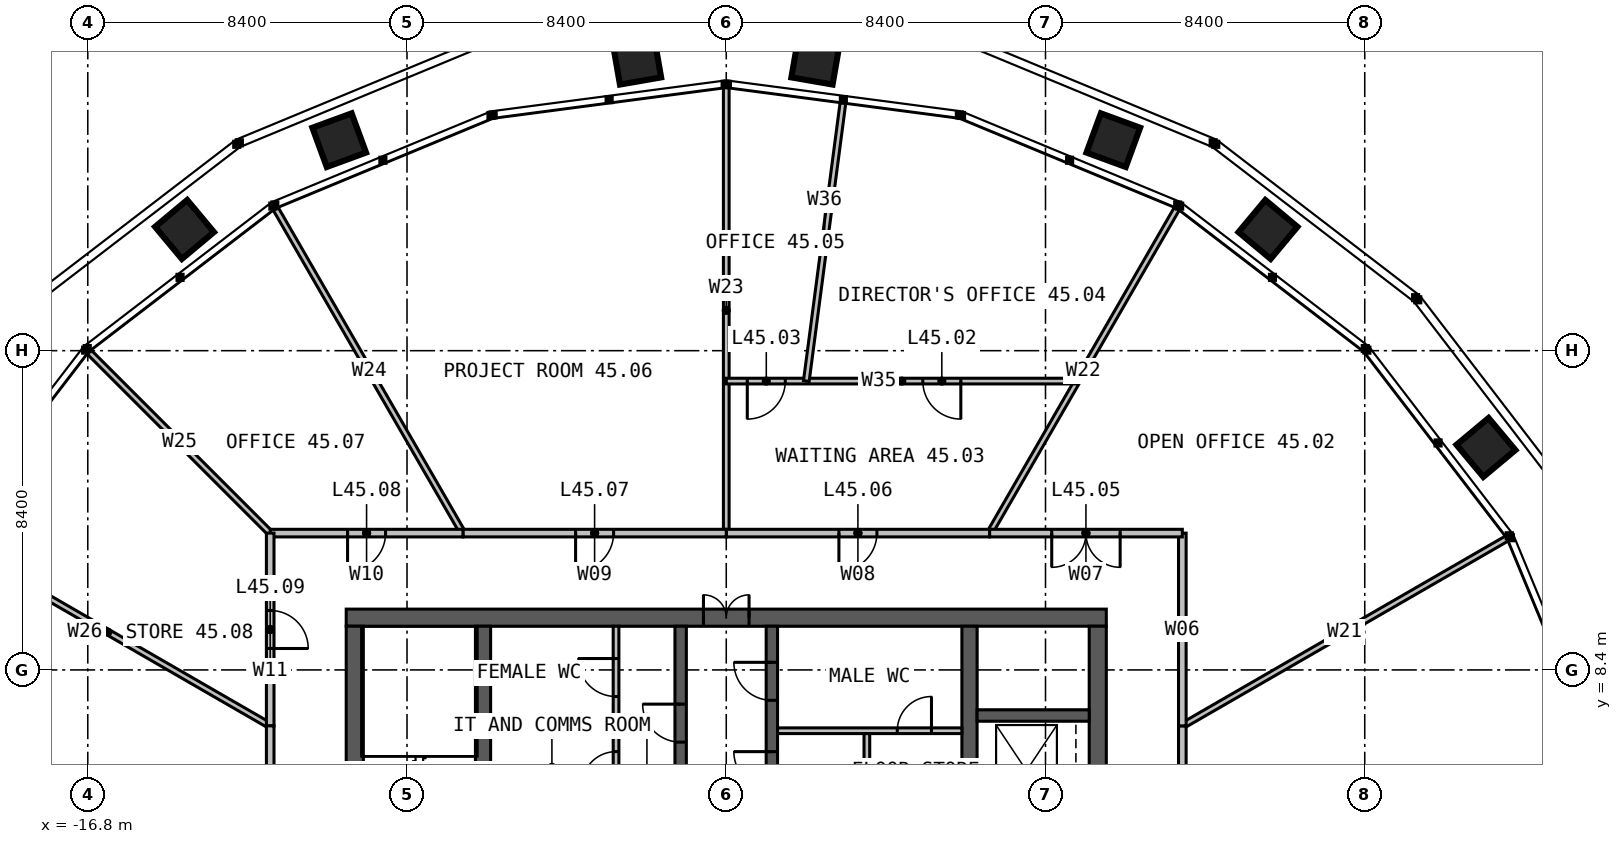
"""IFC4 building model, lengths in metres.
Left out: names, types, materials, properties, quantities, classifications, styles, units other than length and angle.
Written with IfcOpenShell. Run it as: python <this file> out.ifc"""

import sys

from ifc_helpers import new_model, si_unit, direction, frame, frame_2d, origin, place, context, subcontext, project, spatial, rectangle, extrude, element, fill, save


model = new_model("IFC4")
c1 = context("Model", 3, precision=1e-05, world=origin(), true_north=direction((0.0, 1.0)))
c2 = subcontext(c1, "Body", "Model", "MODEL_VIEW")
j1 = project(units=[si_unit("LENGTHUNIT", "METRE"), si_unit("PLANEANGLEUNIT", "RADIAN")], contexts=[c1])
p1 = place(None, origin())
s1 = spatial("IfcSite", under=j1, at=p1, CompositionType="ELEMENT")
p2 = place(p1, origin())
s2 = spatial("IfcBuilding", under=s1, at=p2, CompositionType="ELEMENT")
p3 = place(p2, frame((0.0, 0.0, 187.0)))
s3 = spatial("IfcBuildingStorey", under=s2, at=p3, CompositionType="ELEMENT", Elevation=187.0)
p4 = place(p3, frame((-10.0, 9.775, 0.0), z_axis=(0.0, 0.0, 1.0), x_axis=(1.0, 0.0, 0.0)))
e1 = element("IfcWall", 1, at=p4, inside=s3, PredefinedType="SOLIDWALL", context=c2, shape_type="SweptSolid", body=[
    extrude(rectangle(XDim=20.0, YDim=0.45, at=frame_2d((10.0, 0.0))), origin(), (0.0, 0.0, 1.0), 4.0),
])
p5 = place(p4, frame((9.4, 0.0, 0.0)))
e2 = element("IfcOpeningElement", 2, at=p5, cuts=e1, PredefinedType="OPENING", context=c2, shape_type="SweptSolid", body=[
    extrude(rectangle(XDim=1.2, YDim=2.2, at=frame_2d((0.6, 1.1))), frame((0.0, 0.235, 0.0), z_axis=(0.0, -1.0, 0.0), x_axis=(1.0, 0.0, 0.0)), (0.0, 0.0, 1.0), 0.47),
])
for number, where, z_axis, x_axis in (
    (3, (9.775, -9.55, 0.0), (0.0, 0.0, 1.0), (0.0, 1.0, 0.0)),
    (4, (-9.775, 9.55, 0.0), (0.0, 0.0, 1.0), (0.0, -1.0, 0.0)),
):
    element("IfcWall", number, at=place(p3, frame(where, z_axis=z_axis, x_axis=x_axis)), inside=s3, PredefinedType="SOLIDWALL", context=c2, shape_type="SweptSolid", body=[
        extrude(rectangle(XDim=19.1, YDim=0.45, at=frame_2d((9.55, 0.0))), origin(), (0.0, 0.0, 1.0), 4.0),
    ])
p6 = place(p3, frame((-6.4, -9.55, 0.0), z_axis=(0.0, 0.0, 1.0), x_axis=(0.0, 1.0, 0.0)))
e5 = element("IfcWall", 5, at=p6, inside=s3, PredefinedType="SOLIDWALL", context=c2, shape_type="SweptSolid", body=[
    extrude(rectangle(XDim=19.1, YDim=0.4, at=frame_2d((9.55, 0.0))), origin(), (0.0, 0.0, 1.0), 4.0),
])
p7 = place(p6, frame((9.05, 0.0, 0.0)))
e6 = element("IfcOpeningElement", 6, at=p7, cuts=e5, PredefinedType="OPENING", context=c2, shape_type="SweptSolid", body=[
    extrude(rectangle(XDim=1.0, YDim=2.2, at=frame_2d((0.5, 1.1))), frame((0.0, 0.21, 0.0), z_axis=(0.0, -1.0, 0.0), x_axis=(1.0, 0.0, 0.0)), (0.0, 0.0, 1.0), 0.42),
])
p8 = place(p3, frame((6.4, 9.55, 0.0), z_axis=(0.0, 0.0, 1.0), x_axis=(0.0, -1.0, 0.0)))
e7 = element("IfcWall", 7, at=p8, inside=s3, PredefinedType="SOLIDWALL", context=c2, shape_type="SweptSolid", body=[
    extrude(rectangle(XDim=19.1, YDim=0.4, at=frame_2d((9.55, 0.0))), origin(), (0.0, 0.0, 1.0), 4.0),
])
p9 = place(p8, frame((9.05, 0.0, 0.0)))
e8 = element("IfcOpeningElement", 8, at=p9, cuts=e7, PredefinedType="OPENING", context=c2, shape_type="SweptSolid", body=[
    extrude(rectangle(XDim=1.0, YDim=2.2, at=frame_2d((0.5, 1.1))), frame((0.0, 0.21, 0.0), z_axis=(0.0, -1.0, 0.0), x_axis=(1.0, 0.0, 0.0)), (0.0, 0.0, 1.0), 0.42),
])
p10 = place(p3, frame((-1.2, 1.45, 0.0), z_axis=(0.0, 0.0, 1.0), x_axis=(0.0, 1.0, 0.0)))
e9 = element("IfcWall", 9, at=p10, inside=s3, PredefinedType="SOLIDWALL", context=c2, shape_type="SweptSolid", body=[
    extrude(rectangle(XDim=8.1, YDim=0.3, at=frame_2d((4.05, 0.0))), origin(), (0.0, 0.0, 1.0), 4.0),
])
p11 = place(p10, frame((5.05, 0.0, 0.0)))
e10 = element("IfcOpeningElement", 10, at=p11, cuts=e9, PredefinedType="OPENING", context=c2, shape_type="SweptSolid", body=[
    extrude(rectangle(XDim=1.0, YDim=2.2, at=frame_2d((0.5, 1.1))), frame((0.0, 0.16, 0.0), z_axis=(0.0, -1.0, 0.0), x_axis=(1.0, 0.0, 0.0)), (0.0, 0.0, 1.0), 0.32),
])
p12 = place(p3, frame((1.2, 1.45, 0.0), z_axis=(0.0, 0.0, 1.0), x_axis=(0.0, 1.0, 0.0)))
e11 = element("IfcWall", 11, at=p12, inside=s3, PredefinedType="SOLIDWALL", context=c2, shape_type="SweptSolid", body=[
    extrude(rectangle(XDim=8.1, YDim=0.3, at=frame_2d((4.05, 0.0))), origin(), (0.0, 0.0, 1.0), 4.0),
])
p13 = place(p12, frame((3.8, 0.0, 0.0)))
e12 = element("IfcOpeningElement", 12, at=p13, cuts=e11, PredefinedType="OPENING", context=c2, shape_type="SweptSolid", body=[
    extrude(rectangle(XDim=1.0, YDim=2.2, at=frame_2d((0.5, 1.1))), frame((0.0, 0.16, 0.0), z_axis=(0.0, -1.0, 0.0), x_axis=(1.0, 0.0, 0.0)), (0.0, 0.0, 1.0), 0.32),
])
p14 = place(p12, frame((6.15, 0.0, 0.0)))
e13 = element("IfcOpeningElement", 13, at=p14, cuts=e11, PredefinedType="OPENING", context=c2, shape_type="SweptSolid", body=[
    extrude(rectangle(XDim=1.0, YDim=2.2, at=frame_2d((0.5, 1.1))), frame((0.0, 0.16, 0.0), z_axis=(0.0, -1.0, 0.0), x_axis=(1.0, 0.0, 0.0)), (0.0, 0.0, 1.0), 0.32),
])
p15 = place(p3, frame((6.6, 7.2, 0.0), z_axis=(0.0, 0.0, 1.0), x_axis=(1.0, 0.0, 0.0)))
e14 = element("IfcWall", 14, at=p15, inside=s3, PredefinedType="SOLIDWALL", context=c2, shape_type="SweptSolid", body=[
    extrude(rectangle(XDim=2.95, YDim=0.3, at=frame_2d((1.475, 0.0))), origin(), (0.0, 0.0, 1.0), 4.0),
])
p16 = place(p3, frame((1.35, 6.8, 0.0), z_axis=(0.0, 0.0, 1.0), x_axis=(1.0, 0.0, 0.0)))
e15 = element("IfcWall", 15, at=p16, inside=s3, PredefinedType="PARTITIONING", context=c2, shape_type="SweptSolid", body=[
    extrude(rectangle(XDim=4.85, YDim=0.15, at=frame_2d((2.425, 0.0))), origin(), (0.0, 0.0, 1.0), 3.75),
])
p17 = place(p16, frame((3.15, 0.0, 0.0)))
e16 = element("IfcOpeningElement", 16, at=p17, cuts=e15, PredefinedType="OPENING", context=c2, shape_type="SweptSolid", body=[
    extrude(rectangle(XDim=0.9, YDim=2.2, at=frame_2d((0.45, 1.1))), frame((0.0, 0.085, 0.0), z_axis=(0.0, -1.0, 0.0), x_axis=(1.0, 0.0, 0.0)), (0.0, 0.0, 1.0), 0.17),
])
p18 = place(p3, frame((3.7, 4.75, 0.0), z_axis=(0.0, 0.0, 1.0), x_axis=(0.0, 1.0, 0.0)))
e17 = element("IfcWall", 17, at=p18, inside=s3, PredefinedType="PARTITIONING", context=c2, shape_type="SweptSolid", body=[
    extrude(rectangle(XDim=1.975, YDim=0.15, at=frame_2d((0.988, 0.0))), origin(), (0.0, 0.0, 1.0), 3.75),
])
p19 = place(p3, frame((-2.9, 4.75, 0.0), z_axis=(0.0, 0.0, 1.0), x_axis=(0.0, 1.0, 0.0)))
e18 = element("IfcWall", 18, at=p19, inside=s3, PredefinedType="PARTITIONING", context=c2, shape_type="SweptSolid", body=[
    extrude(rectangle(XDim=4.8, YDim=0.15, at=frame_2d((2.4, 0.0))), origin(), (0.0, 0.0, 1.0), 3.75),
])
p20 = place(p19, frame((2.95, 0.0, 0.0)))
e19 = element("IfcOpeningElement", 19, at=p20, cuts=e18, PredefinedType="OPENING", context=c2, shape_type="SweptSolid", body=[
    extrude(rectangle(XDim=1.0, YDim=2.2, at=frame_2d((0.5, 1.1))), frame((0.0, 0.085, 0.0), z_axis=(0.0, -1.0, 0.0), x_axis=(1.0, 0.0, 0.0)), (0.0, 0.0, 1.0), 0.17),
])
p21 = place(p19, frame((0.6, 0.0, 0.0)))
e20 = element("IfcOpeningElement", 20, at=p21, cuts=e18, PredefinedType="OPENING", context=c2, shape_type="SweptSolid", body=[
    extrude(rectangle(XDim=0.9, YDim=2.2, at=frame_2d((0.45, 1.1))), frame((0.0, 0.085, 0.0), z_axis=(0.0, -1.0, 0.0), x_axis=(1.0, 0.0, 0.0)), (0.0, 0.0, 1.0), 0.17),
])
p22 = place(p3, frame((-6.2, 7.0, 0.0), z_axis=(0.0, 0.0, 1.0), x_axis=(1.0, 0.0, 0.0)))
e21 = element("IfcWall", 21, at=p22, inside=s3, PredefinedType="PARTITIONING", context=c2, shape_type="SweptSolid", body=[
    extrude(rectangle(XDim=3.225, YDim=0.15, at=frame_2d((1.612, 0.0))), origin(), (0.0, 0.0, 1.0), 3.75),
])
for number, where, z_axis, x_axis in (
    (22, (12.0, 6.928, 0.0), (0.0, 0.0, 1.0), (0.866, 0.5, 0.0)),
    (23, (6.928, 12.0, 0.0), (0.0, 0.0, 1.0), (0.5, 0.866, 0.0)),
):
    element("IfcWall", number, at=place(p3, frame(where, z_axis=z_axis, x_axis=x_axis)), inside=s3, PredefinedType="PARTITIONING", context=c2, shape_type="SweptSolid", body=[
        extrude(rectangle(XDim=9.865, YDim=0.15, at=frame_2d((4.932, 0.0))), origin(), (0.0, 0.0, 1.0), 2.79),
    ])
p23 = place(p3, frame((0.0, 12.0, 0.0), z_axis=(0.0, 0.0, 1.0), x_axis=(0.0, 1.0, 0.0)))
e24 = element("IfcWall", 24, at=p23, inside=s3, PredefinedType="PARTITIONING", context=c2, shape_type="SweptSolid", body=[
    extrude(rectangle(XDim=11.721, YDim=0.15, at=frame_2d((5.861, 0.0))), origin(), (0.0, 0.0, 1.0), 2.79),
])
p24 = place(p3, frame((-6.928, 12.0, 0.0), z_axis=(0.0, 0.0, 1.0), x_axis=(-0.49999595416, 0.866027739639, 0.0)))
e25 = element("IfcWall", 25, at=p24, inside=s3, PredefinedType="PARTITIONING", context=c2, shape_type="SweptSolid", body=[
    extrude(rectangle(XDim=9.865, YDim=0.15, at=frame_2d((4.932, 0.0))), origin(), (0.0, 0.0, 1.0), 2.79),
])
p25 = place(p3, frame((-12.0, 12.0, 0.0), z_axis=(0.0, 0.0, 1.0), x_axis=(-0.707106781187, 0.707106781187, 0.0)))
e26 = element("IfcWall", 26, at=p25, inside=s3, PredefinedType="PARTITIONING", context=c2, shape_type="SweptSolid", body=[
    extrude(rectangle(XDim=6.751, YDim=0.15, at=frame_2d((3.375, 0.0))), origin(), (0.0, 0.0, 1.0), 2.79),
])
p26 = place(p3, frame((-12.0, 6.928, 0.0), z_axis=(0.0, 0.0, 1.0), x_axis=(-0.866027739639, 0.49999595416, 0.0)))
e27 = element("IfcWall", 27, at=p26, inside=s3, PredefinedType="PARTITIONING", context=c2, shape_type="SweptSolid", body=[
    extrude(rectangle(XDim=9.865, YDim=0.15, at=frame_2d((4.932, 0.0))), origin(), (0.0, 0.0, 1.0), 2.79),
])
p27 = place(p3, frame((12.0, -6.928, 0.0), z_axis=(0.0, 0.0, 1.0), x_axis=(0.0, 1.0, 0.0)))
e28 = element("IfcWall", 28, at=p27, inside=s3, PredefinedType="PARTITIONING", context=c2, shape_type="SweptSolid", body=[
    extrude(rectangle(XDim=13.856, YDim=0.2, at=frame_2d((6.928, 0.0))), origin(), (0.0, 0.0, 1.0), 3.8),
])
p28 = place(p27, frame((6.028, 0.0, 0.0)))
e29 = element("IfcOpeningElement", 29, at=p28, cuts=e28, PredefinedType="OPENING", context=c2, shape_type="SweptSolid", body=[
    extrude(rectangle(XDim=1.8, YDim=2.2, at=frame_2d((0.9, 1.1))), frame((0.0, 0.11, 0.0), z_axis=(0.0, -1.0, 0.0), x_axis=(1.0, 0.0, 0.0)), (0.0, 0.0, 1.0), 0.22),
])
p29 = place(p3, frame((12.0, 6.928, 0.0), z_axis=(0.0, 0.0, 1.0), x_axis=(0.0, 1.0, 0.0)))
e30 = element("IfcWall", 30, at=p29, inside=s3, PredefinedType="PARTITIONING", context=c2, shape_type="SweptSolid", body=[
    extrude(rectangle(XDim=5.072, YDim=0.2, at=frame_2d((2.536, 0.0))), origin(), (0.0, 0.0, 1.0), 3.8),
])
p30 = place(p3, frame((12.0, 12.0, 0.0), z_axis=(0.0, 0.0, 1.0), x_axis=(-1.0, 0.0, 0.0)))
e31 = element("IfcWall", 31, at=p30, inside=s3, PredefinedType="PARTITIONING", context=c2, shape_type="SweptSolid", body=[
    extrude(rectangle(XDim=5.072, YDim=0.2, at=frame_2d((2.536, 0.0))), origin(), (0.0, 0.0, 1.0), 3.8),
])
p31 = place(p30, frame((1.636, 0.0, 0.0)))
e32 = element("IfcOpeningElement", 32, at=p31, cuts=e31, PredefinedType="OPENING", context=c2, shape_type="SweptSolid", body=[
    extrude(rectangle(XDim=1.8, YDim=2.2, at=frame_2d((0.9, 1.1))), frame((0.0, 0.11, 0.0), z_axis=(0.0, -1.0, 0.0), x_axis=(1.0, 0.0, 0.0)), (0.0, 0.0, 1.0), 0.22),
])
p32 = place(p3, frame((9.238, 16.0, 0.0), z_axis=(0.0, 0.0, 1.0), x_axis=(-1.0, 0.0, 0.0)))
e33 = element("IfcWall", 33, at=p32, inside=s3, PredefinedType="PARTITIONING", context=c2, shape_type="SweptSolid", body=[
    extrude(rectangle(XDim=9.238, YDim=0.15, at=frame_2d((4.619, 0.0))), origin(), (0.0, 0.0, 1.0), 2.79),
])
p33 = place(p32, frame((3.066, 0.0, 0.0)))
e34 = element("IfcOpeningElement", 34, at=p33, cuts=e33, PredefinedType="OPENING", context=c2, shape_type="SweptSolid", body=[
    extrude(rectangle(XDim=1.0, YDim=2.2, at=frame_2d((0.5, 1.1))), frame((0.0, 0.085, 0.0), z_axis=(0.0, -1.0, 0.0), x_axis=(1.0, 0.0, 0.0)), (0.0, 0.0, 1.0), 0.17),
])
p34 = place(p32, frame((7.684, 0.0, 0.0)))
e35 = element("IfcOpeningElement", 35, at=p34, cuts=e33, PredefinedType="OPENING", context=c2, shape_type="SweptSolid", body=[
    extrude(rectangle(XDim=1.0, YDim=2.2, at=frame_2d((0.5, 1.1))), frame((0.0, 0.085, 0.0), z_axis=(0.0, -1.0, 0.0), x_axis=(1.0, 0.0, 0.0)), (0.0, 0.0, 1.0), 0.17),
])
p35 = place(p3, frame((2.106, 16.0, 0.0), z_axis=(0.0, 0.0, 1.0), x_axis=(0.130534093561, 0.991443821111, 0.0)))
e36 = element("IfcWall", 36, at=p35, inside=s3, PredefinedType="PARTITIONING", context=c2, shape_type="SweptSolid", body=[
    extrude(rectangle(XDim=7.38, YDim=0.15, at=frame_2d((3.69, 0.0))), origin(), (0.0, 0.0, 1.0), 2.79),
])
p36 = place(p3, frame((6.928, 12.0, 0.0), z_axis=(0.0, 0.0, 1.0), x_axis=(-1.0, 0.0, 0.0)))
e37 = element("IfcWall", 37, at=p36, inside=s3, PredefinedType="PARTITIONING", context=c2, shape_type="SweptSolid", body=[
    extrude(rectangle(XDim=6.928, YDim=0.2, at=frame_2d((3.464, 0.0))), origin(), (0.0, 0.0, 1.0), 3.8),
])
p37 = place(p36, frame((2.964, 0.0, 0.0)))
e38 = element("IfcOpeningElement", 38, at=p37, cuts=e37, PredefinedType="OPENING", context=c2, shape_type="SweptSolid", body=[
    extrude(rectangle(XDim=1.0, YDim=2.2, at=frame_2d((0.5, 1.1))), frame((0.0, 0.11, 0.0), z_axis=(0.0, -1.0, 0.0), x_axis=(1.0, 0.0, 0.0)), (0.0, 0.0, 1.0), 0.22),
])
p38 = place(p3, frame((0.0, 12.0, 0.0), z_axis=(0.0, 0.0, 1.0), x_axis=(-1.0, 0.0, 0.0)))
e39 = element("IfcWall", 39, at=p38, inside=s3, PredefinedType="PARTITIONING", context=c2, shape_type="SweptSolid", body=[
    extrude(rectangle(XDim=6.928, YDim=0.2, at=frame_2d((3.464, 0.0))), origin(), (0.0, 0.0, 1.0), 3.8),
])
p39 = place(p38, frame((2.964, 0.0, 0.0)))
e40 = element("IfcOpeningElement", 40, at=p39, cuts=e39, PredefinedType="OPENING", context=c2, shape_type="SweptSolid", body=[
    extrude(rectangle(XDim=1.0, YDim=2.2, at=frame_2d((0.5, 1.1))), frame((0.0, 0.11, 0.0), z_axis=(0.0, -1.0, 0.0), x_axis=(1.0, 0.0, 0.0)), (0.0, 0.0, 1.0), 0.22),
])
p40 = place(p3, frame((-6.928, 12.0, 0.0), z_axis=(0.0, 0.0, 1.0), x_axis=(-1.0, 0.0, 0.0)))
e41 = element("IfcWall", 41, at=p40, inside=s3, PredefinedType="PARTITIONING", context=c2, shape_type="SweptSolid", body=[
    extrude(rectangle(XDim=5.072, YDim=0.2, at=frame_2d((2.536, 0.0))), origin(), (0.0, 0.0, 1.0), 3.8),
])
p41 = place(p40, frame((2.036, 0.0, 0.0)))
e42 = element("IfcOpeningElement", 42, at=p41, cuts=e41, PredefinedType="OPENING", context=c2, shape_type="SweptSolid", body=[
    extrude(rectangle(XDim=1.0, YDim=2.2, at=frame_2d((0.5, 1.1))), frame((0.0, 0.11, 0.0), z_axis=(0.0, -1.0, 0.0), x_axis=(1.0, 0.0, 0.0)), (0.0, 0.0, 1.0), 0.22),
])
p42 = place(p3, frame((-12.0, 12.0, 0.0), z_axis=(0.0, 0.0, 1.0), x_axis=(0.0, -1.0, 0.0)))
e43 = element("IfcWall", 43, at=p42, inside=s3, PredefinedType="PARTITIONING", context=c2, shape_type="SweptSolid", body=[
    extrude(rectangle(XDim=5.072, YDim=0.2, at=frame_2d((2.536, 0.0))), origin(), (0.0, 0.0, 1.0), 3.8),
])
p43 = place(p42, frame((2.036, 0.0, 0.0)))
e44 = element("IfcOpeningElement", 44, at=p43, cuts=e43, PredefinedType="OPENING", context=c2, shape_type="SweptSolid", body=[
    extrude(rectangle(XDim=1.0, YDim=2.2, at=frame_2d((0.5, 1.1))), frame((0.0, 0.11, 0.0), z_axis=(0.0, -1.0, 0.0), x_axis=(1.0, 0.0, 0.0)), (0.0, 0.0, 1.0), 0.22),
])
p44 = place(p3, frame((-12.0, 6.928, 0.0), z_axis=(0.0, 0.0, 1.0), x_axis=(0.0, -1.0, 0.0)))
e45 = element("IfcWall", 45, at=p44, inside=s3, PredefinedType="PARTITIONING", context=c2, shape_type="SweptSolid", body=[
    extrude(rectangle(XDim=10.144, YDim=0.2, at=frame_2d((5.072, 0.0))), origin(), (0.0, 0.0, 1.0), 3.8),
])
p45 = place(p44, frame((4.172, 0.0, 0.0)))
e46 = element("IfcOpeningElement", 46, at=p45, cuts=e45, PredefinedType="OPENING", context=c2, shape_type="SweptSolid", body=[
    extrude(rectangle(XDim=1.8, YDim=2.2, at=frame_2d((0.9, 1.1))), frame((0.0, 0.11, 0.0), z_axis=(0.0, -1.0, 0.0), x_axis=(1.0, 0.0, 0.0)), (0.0, 0.0, 1.0), 0.22),
])
p46 = place(p5, origin())
e47 = element("IfcDoor", 47, at=p46, inside=s3, OperationType="DOUBLE_DOOR_SINGLE_SWING", PredefinedType="DOOR", context=c2, shape_type="SweptSolid", body=[
    extrude(rectangle(XDim=1.2, YDim=2.2, at=frame_2d((0.6, 1.1))), frame((0.0, 0.025, 0.0), z_axis=(0.0, -1.0, 0.0), x_axis=(1.0, 0.0, 0.0)), (0.0, 0.0, 1.0), 0.05),
])
fill(e2, e47)
p47 = place(p11, origin())
e48 = element("IfcDoor", 48, at=p47, inside=s3, OperationType="SINGLE_SWING_RIGHT", PredefinedType="DOOR", context=c2, shape_type="SweptSolid", body=[
    extrude(rectangle(XDim=1.0, YDim=2.2, at=frame_2d((0.5, 1.1))), frame((0.0, 0.025, 0.0), z_axis=(0.0, -1.0, 0.0), x_axis=(1.0, 0.0, 0.0)), (0.0, 0.0, 1.0), 0.05),
])
fill(e10, e48)
p48 = place(p13, origin())
e49 = element("IfcDoor", 49, at=p48, inside=s3, OperationType="SINGLE_SWING_RIGHT", PredefinedType="DOOR", context=c2, shape_type="SweptSolid", body=[
    extrude(rectangle(XDim=1.0, YDim=2.2, at=frame_2d((0.5, 1.1))), frame((0.0, 0.025, 0.0), z_axis=(0.0, -1.0, 0.0), x_axis=(1.0, 0.0, 0.0)), (0.0, 0.0, 1.0), 0.05),
])
fill(e12, e49)
p49 = place(p14, origin())
e50 = element("IfcDoor", 50, at=p49, inside=s3, OperationType="SINGLE_SWING_RIGHT", PredefinedType="DOOR", context=c2, shape_type="SweptSolid", body=[
    extrude(rectangle(XDim=1.0, YDim=2.2, at=frame_2d((0.5, 1.1))), frame((0.0, 0.025, 0.0), z_axis=(0.0, -1.0, 0.0), x_axis=(1.0, 0.0, 0.0)), (0.0, 0.0, 1.0), 0.05),
])
fill(e13, e50)
p50 = place(p17, origin())
e51 = element("IfcDoor", 51, at=p50, inside=s3, OperationType="SINGLE_SWING_RIGHT", PredefinedType="DOOR", context=c2, shape_type="SweptSolid", body=[
    extrude(rectangle(XDim=0.9, YDim=2.2, at=frame_2d((0.45, 1.1))), frame((0.0, 0.025, 0.0), z_axis=(0.0, -1.0, 0.0), x_axis=(1.0, 0.0, 0.0)), (0.0, 0.0, 1.0), 0.05),
])
fill(e16, e51)
p51 = place(p20, origin())
e52 = element("IfcDoor", 52, at=p51, inside=s3, OperationType="SINGLE_SWING_RIGHT", PredefinedType="DOOR", context=c2, shape_type="SweptSolid", body=[
    extrude(rectangle(XDim=1.0, YDim=2.2, at=frame_2d((0.5, 1.1))), frame((0.0, 0.025, 0.0), z_axis=(0.0, -1.0, 0.0), x_axis=(1.0, 0.0, 0.0)), (0.0, 0.0, 1.0), 0.05),
])
fill(e19, e52)
p52 = place(p21, origin())
e53 = element("IfcDoor", 53, at=p52, inside=s3, OperationType="SINGLE_SWING_LEFT", PredefinedType="DOOR", context=c2, shape_type="SweptSolid", body=[
    extrude(rectangle(XDim=0.9, YDim=2.2, at=frame_2d((0.45, 1.1))), frame((0.0, 0.025, 0.0), z_axis=(0.0, -1.0, 0.0), x_axis=(1.0, 0.0, 0.0)), (0.0, 0.0, 1.0), 0.05),
])
fill(e20, e53)
p53 = place(p31, origin())
e54 = element("IfcDoor", 54, at=p53, inside=s3, OperationType="DOUBLE_DOOR_SINGLE_SWING", PredefinedType="DOOR", context=c2, shape_type="SweptSolid", body=[
    extrude(rectangle(XDim=1.8, YDim=2.2, at=frame_2d((0.9, 1.1))), frame((0.0, 0.025, 0.0), z_axis=(0.0, -1.0, 0.0), x_axis=(1.0, 0.0, 0.0)), (0.0, 0.0, 1.0), 0.05),
])
fill(e32, e54)
p54 = place(p33, origin())
e55 = element("IfcDoor", 55, at=p54, inside=s3, OperationType="SINGLE_SWING_LEFT", PredefinedType="DOOR", context=c2, shape_type="SweptSolid", body=[
    extrude(rectangle(XDim=1.0, YDim=2.2, at=frame_2d((0.5, 1.1))), frame((0.0, 0.025, 0.0), z_axis=(0.0, -1.0, 0.0), x_axis=(1.0, 0.0, 0.0)), (0.0, 0.0, 1.0), 0.05),
])
fill(e34, e55)
p55 = place(p34, origin())
e56 = element("IfcDoor", 56, at=p55, inside=s3, OperationType="SINGLE_SWING_RIGHT", PredefinedType="DOOR", context=c2, shape_type="SweptSolid", body=[
    extrude(rectangle(XDim=1.0, YDim=2.2, at=frame_2d((0.5, 1.1))), frame((0.0, 0.025, 0.0), z_axis=(0.0, -1.0, 0.0), x_axis=(1.0, 0.0, 0.0)), (0.0, 0.0, 1.0), 0.05),
])
fill(e35, e56)
p56 = place(p37, origin())
e57 = element("IfcDoor", 57, at=p56, inside=s3, OperationType="SINGLE_SWING_RIGHT", PredefinedType="DOOR", context=c2, shape_type="SweptSolid", body=[
    extrude(rectangle(XDim=1.0, YDim=2.2, at=frame_2d((0.5, 1.1))), frame((0.0, 0.025, 0.0), z_axis=(0.0, -1.0, 0.0), x_axis=(1.0, 0.0, 0.0)), (0.0, 0.0, 1.0), 0.05),
])
fill(e38, e57)
p57 = place(p39, origin())
e58 = element("IfcDoor", 58, at=p57, inside=s3, OperationType="SINGLE_SWING_RIGHT", PredefinedType="DOOR", context=c2, shape_type="SweptSolid", body=[
    extrude(rectangle(XDim=1.0, YDim=2.2, at=frame_2d((0.5, 1.1))), frame((0.0, 0.025, 0.0), z_axis=(0.0, -1.0, 0.0), x_axis=(1.0, 0.0, 0.0)), (0.0, 0.0, 1.0), 0.05),
])
fill(e40, e58)
p58 = place(p41, origin())
e59 = element("IfcDoor", 59, at=p58, inside=s3, OperationType="SINGLE_SWING_RIGHT", PredefinedType="DOOR", context=c2, shape_type="SweptSolid", body=[
    extrude(rectangle(XDim=1.0, YDim=2.2, at=frame_2d((0.5, 1.1))), frame((0.0, 0.025, 0.0), z_axis=(0.0, -1.0, 0.0), x_axis=(1.0, 0.0, 0.0)), (0.0, 0.0, 1.0), 0.05),
])
fill(e42, e59)
p59 = place(p43, origin())
e60 = element("IfcDoor", 60, at=p59, inside=s3, OperationType="SINGLE_SWING_RIGHT", PredefinedType="DOOR", context=c2, shape_type="SweptSolid", body=[
    extrude(rectangle(XDim=1.0, YDim=2.2, at=frame_2d((0.5, 1.1))), frame((0.0, 0.025, 0.0), z_axis=(0.0, -1.0, 0.0), x_axis=(1.0, 0.0, 0.0)), (0.0, 0.0, 1.0), 0.05),
])
fill(e44, e60)
save(model, sys.argv[1])
